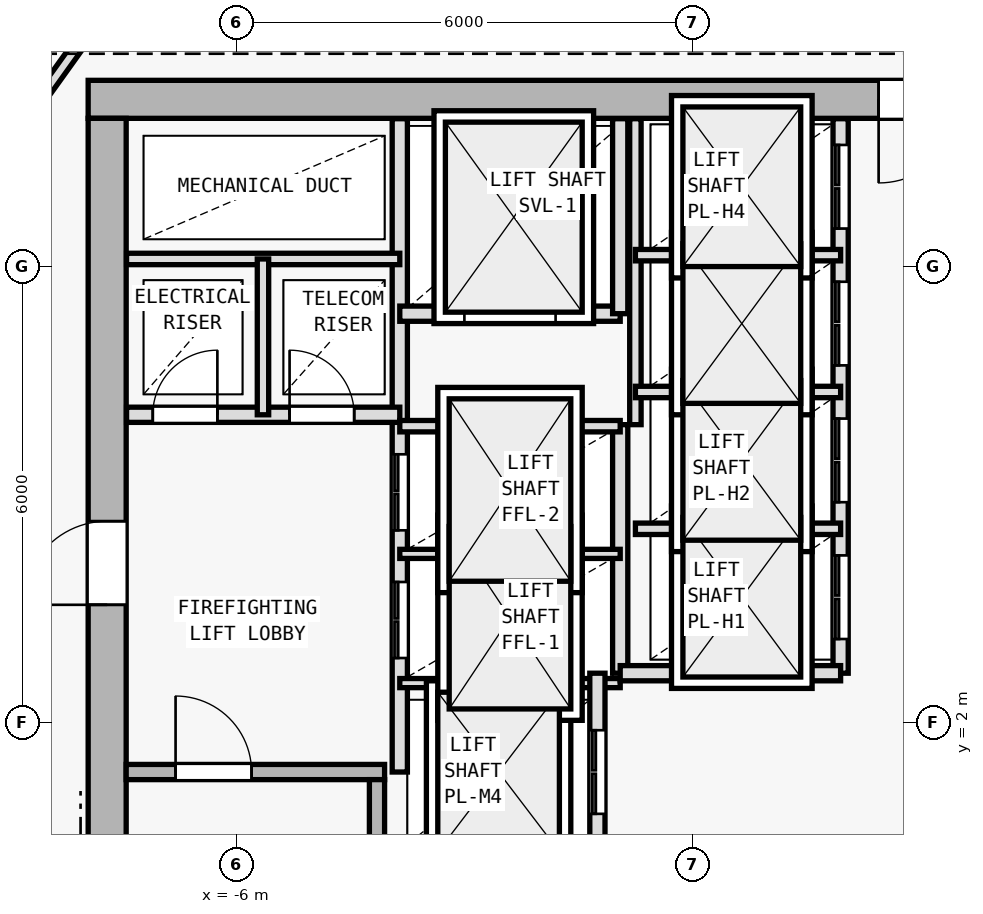
"""IFC4 building model, lengths in metres.
Left out: names, types, materials, properties, quantities, classifications, styles, units other than length and angle.
Written with IfcOpenShell. Run it as: python <this file> out.ifc"""

import sys

from ifc_helpers import new_model, si_unit, direction, frame, frame_2d, origin, origin_2d, place, context, subcontext, project, spatial, rectangle, i_section, extrude, element, fill, save


model = new_model("IFC4")
c1 = context("Model", 3, precision=1e-05, world=origin(), true_north=direction((0.0, 1.0)))
c2 = subcontext(c1, "Body", "Model", "MODEL_VIEW")
j1 = project(units=[si_unit("LENGTHUNIT", "METRE"), si_unit("PLANEANGLEUNIT", "RADIAN")], contexts=[c1])
p1 = place(None, origin())
s1 = spatial("IfcSite", under=j1, at=p1, CompositionType="ELEMENT")
p2 = place(p1, origin())
s2 = spatial("IfcBuilding", under=s1, at=p2, CompositionType="ELEMENT")
p3 = place(p2, frame((0.0, 0.0, 209.1)))
s3 = spatial("IfcBuildingStorey", under=s2, at=p3, CompositionType="ELEMENT", Elevation=209.1)
for number, where, z_axis, x_axis in (
    (1, (-7.7, 10.2, 0.0), (0.0, 0.0, 1.0), (1.0, 0.0, 0.0)),
    (2, (-7.7, 2.0, 0.0), (0.0, 0.0, 1.0), (1.0, 0.0, 0.0)),
):
    element("IfcColumn", number, at=place(p3, frame(where, z_axis=z_axis, x_axis=x_axis)), inside=s3, PredefinedType="COLUMN", context=c2, shape_type="SweptSolid", body=[
        extrude(i_section(OverallWidth=0.398, OverallDepth=0.387, WebThickness=0.013, FlangeThickness=0.022, FilletRadius=0.015, at=origin_2d()), origin(), (0.0, 0.0, 1.0), 3.6),
    ])
p4 = place(p3, frame((7.95, 10.2, 0.0), z_axis=(0.0, 0.0, 1.0), x_axis=(-1.0, 0.0, 0.0)))
e3 = element("IfcWall", 3, at=p4, inside=s3, PredefinedType="SHEAR", context=c2, shape_type="SweptSolid", body=[
    extrude(rectangle(XDim=15.9, YDim=0.5, at=frame_2d((7.95, 0.0))), origin(), (0.0, 0.0, 1.0), 3.35),
])
p5 = place(p4, frame((4.4, 0.0, 0.0)))
e4 = element("IfcOpeningElement", 4, at=p5, cuts=e3, PredefinedType="OPENING", context=c2, shape_type="SweptSolid", body=[
    extrude(rectangle(XDim=1.1, YDim=2.15, at=frame_2d((0.55, 1.075))), frame((0.0, 0.26, 0.0), z_axis=(0.0, -1.0, 0.0), x_axis=(1.0, 0.0, 0.0)), (0.0, 0.0, 1.0), 0.52),
])
p6 = place(p3, frame((-7.7, -9.15, 0.0), z_axis=(0.0, 0.0, 1.0), x_axis=(0.0, 1.0, 0.0)))
e5 = element("IfcWall", 5, at=p6, inside=s3, PredefinedType="SHEAR", context=c2, shape_type="SweptSolid", body=[
    extrude(rectangle(XDim=19.1, YDim=0.5, at=frame_2d((9.55, 0.0))), origin(), (0.0, 0.0, 1.0), 3.35),
])
p7 = place(p6, frame((12.7, 0.0, 0.0)))
e6 = element("IfcOpeningElement", 6, at=p7, cuts=e5, PredefinedType="OPENING", context=c2, shape_type="SweptSolid", body=[
    extrude(rectangle(XDim=1.1, YDim=2.15, at=frame_2d((0.55, 1.075))), frame((0.0, 0.26, 0.0), z_axis=(0.0, -1.0, 0.0), x_axis=(1.0, 0.0, 0.0)), (0.0, 0.0, 1.0), 0.52),
])
p8 = place(p3, frame((-7.45, 1.35, 0.0), z_axis=(0.0, 0.0, 1.0), x_axis=(1.0, 0.0, 0.0)))
e7 = element("IfcWall", 7, at=p8, inside=s3, PredefinedType="SOLIDWALL", context=c2, shape_type="SweptSolid", body=[
    extrude(rectangle(XDim=3.4, YDim=0.2, at=frame_2d((1.7, 0.0))), origin(), (0.0, 0.0, 1.0), 3.35),
])
p9 = place(p8, frame((0.65, 0.0, 0.0)))
e8 = element("IfcOpeningElement", 8, at=p9, cuts=e7, PredefinedType="OPENING", context=c2, shape_type="SweptSolid", body=[
    extrude(rectangle(XDim=1.0, YDim=2.15, at=frame_2d((0.5, 1.075))), frame((0.0, 0.11, 0.0), z_axis=(0.0, -1.0, 0.0), x_axis=(1.0, 0.0, 0.0)), (0.0, 0.0, 1.0), 0.22),
])
p10 = place(p3, frame((-4.15, -5.95, 0.0), z_axis=(0.0, 0.0, 1.0), x_axis=(0.0, 1.0, 0.0)))
e9 = element("IfcWall", 9, at=p10, inside=s3, PredefinedType="SOLIDWALL", context=c2, shape_type="SweptSolid", body=[
    extrude(rectangle(XDim=7.2, YDim=0.2, at=frame_2d((3.6, 0.0))), origin(), (0.0, 0.0, 1.0), 3.35),
])
p11 = place(p3, frame((-3.85, 1.35, 0.0), z_axis=(0.0, 0.0, 1.0), x_axis=(0.0, 1.0, 0.0)))
e10 = element("IfcWall", 10, at=p11, inside=s3, PredefinedType="SOLIDWALL", context=c2, shape_type="SweptSolid", body=[
    extrude(rectangle(XDim=8.595, YDim=0.2, at=frame_2d((4.297, 0.0))), origin(), (0.0, 0.0, 1.0), 3.35),
])
p12 = place(p11, frame((1.5, 0.0, 0.0)))
e11 = element("IfcOpeningElement", 11, at=p12, cuts=e10, PredefinedType="OPENING", context=c2, shape_type="SweptSolid", body=[
    extrude(rectangle(XDim=1.0, YDim=2.15, at=frame_2d((0.5, 1.075))), frame((0.0, 0.11, 0.0), z_axis=(0.0, -1.0, 0.0), x_axis=(1.0, 0.0, 0.0)), (0.0, 0.0, 1.0), 0.22),
])
p13 = place(p11, frame((3.18, 0.0, 0.0)))
e12 = element("IfcOpeningElement", 12, at=p13, cuts=e10, PredefinedType="OPENING", context=c2, shape_type="SweptSolid", body=[
    extrude(rectangle(XDim=1.0, YDim=2.15, at=frame_2d((0.5, 1.075))), frame((0.0, 0.11, 0.0), z_axis=(0.0, -1.0, 0.0), x_axis=(1.0, 0.0, 0.0)), (0.0, 0.0, 1.0), 0.22),
])
p14 = place(p3, frame((-7.445, 6.05, 0.0), z_axis=(0.0, 0.0, 1.0), x_axis=(1.0, 0.0, 0.0)))
e13 = element("IfcWall", 13, at=p14, inside=s3, PredefinedType="SOLIDWALL", context=c2, shape_type="SweptSolid", body=[
    extrude(rectangle(XDim=3.595, YDim=0.2, at=frame_2d((1.797, 0.0))), origin(), (0.0, 0.0, 1.0), 3.35),
])
p15 = place(p14, frame((0.345, 0.0, 0.0)))
e14 = element("IfcOpeningElement", 14, at=p15, cuts=e13, PredefinedType="OPENING", context=c2, shape_type="SweptSolid", body=[
    extrude(rectangle(XDim=0.85, YDim=2.1, at=frame_2d((0.425, 1.05))), frame((0.0, 0.11, 0.0), z_axis=(0.0, -1.0, 0.0), x_axis=(1.0, 0.0, 0.0)), (0.0, 0.0, 1.0), 0.22),
])
p16 = place(p14, frame((2.145, 0.0, 0.0)))
e15 = element("IfcOpeningElement", 15, at=p16, cuts=e13, PredefinedType="OPENING", context=c2, shape_type="SweptSolid", body=[
    extrude(rectangle(XDim=0.85, YDim=2.1, at=frame_2d((0.425, 1.05))), frame((0.0, 0.11, 0.0), z_axis=(0.0, -1.0, 0.0), x_axis=(1.0, 0.0, 0.0)), (0.0, 0.0, 1.0), 0.22),
])
p17 = place(p3, frame((-7.445, 8.1, 0.0), z_axis=(0.0, 0.0, 1.0), x_axis=(1.0, 0.0, 0.0)))
e16 = element("IfcWall", 16, at=p17, inside=s3, PredefinedType="PARTITIONING", context=c2, shape_type="SweptSolid", body=[
    extrude(rectangle(XDim=3.595, YDim=0.15, at=frame_2d((1.797, 0.0))), origin(), (0.0, 0.0, 1.0), 3.35),
])
p18 = place(p3, frame((-5.65, 6.05, 0.0), z_axis=(0.0, 0.0, 1.0), x_axis=(0.0, 1.0, 0.0)))
e17 = element("IfcWall", 17, at=p18, inside=s3, PredefinedType="PARTITIONING", context=c2, shape_type="SweptSolid", body=[
    extrude(rectangle(XDim=2.05, YDim=0.15, at=frame_2d((1.025, 0.0))), origin(), (0.0, 0.0, 1.0), 3.35),
])
p19 = place(p3, frame((-0.95, 2.65, 0.0), z_axis=(0.0, 0.0, 1.0), x_axis=(0.0, 1.0, 0.0)))
e18 = element("IfcWall", 18, at=p19, inside=s3, PredefinedType="SOLIDWALL", context=c2, shape_type="SweptSolid", body=[
    extrude(rectangle(XDim=3.27, YDim=0.2, at=frame_2d((1.635, 0.0))), origin(), (0.0, 0.0, 1.0), 3.35),
])
for number, where, z_axis, x_axis in (
    (19, (-3.85, 2.52, 0.0), (0.0, 0.0, 1.0), (1.0, 0.0, 0.0)),
    (20, (-3.85, 4.22, 0.0), (0.0, 0.0, 1.0), (1.0, 0.0, 0.0)),
):
    element("IfcWall", number, at=place(p3, frame(where, z_axis=z_axis, x_axis=x_axis)), inside=s3, PredefinedType="PARTITIONING", context=c2, shape_type="SweptSolid", body=[
        extrude(rectangle(XDim=2.9, YDim=0.12, at=frame_2d((1.45, 0.0))), origin(), (0.0, 0.0, 1.0), 3.35),
    ])
p20 = place(p3, frame((-3.85, 5.9, 0.0), z_axis=(0.0, 0.0, 1.0), x_axis=(1.0, 0.0, 0.0)))
e21 = element("IfcWall", 21, at=p20, inside=s3, PredefinedType="PARTITIONING", context=c2, shape_type="SweptSolid", body=[
    extrude(rectangle(XDim=2.9, YDim=0.15, at=frame_2d((1.45, 0.0))), origin(), (0.0, 0.0, 1.0), 3.35),
])
p21 = place(p3, frame((-3.85, 7.38, 0.0), z_axis=(0.0, 0.0, 1.0), x_axis=(1.0, 0.0, 0.0)))
e22 = element("IfcWall", 22, at=p21, inside=s3, PredefinedType="SOLIDWALL", context=c2, shape_type="SweptSolid", body=[
    extrude(rectangle(XDim=2.9, YDim=0.2, at=frame_2d((1.45, 0.0))), origin(), (0.0, 0.0, 1.0), 3.35),
])
p22 = place(p21, frame((0.85, 0.0, 0.0)))
e23 = element("IfcOpeningElement", 23, at=p22, cuts=e22, PredefinedType="OPENING", context=c2, shape_type="SweptSolid", body=[
    extrude(rectangle(XDim=1.2, YDim=2.2, at=frame_2d((0.6, 1.1))), frame((0.0, 0.11, 0.0), z_axis=(0.0, -1.0, 0.0), x_axis=(1.0, 0.0, 0.0)), (0.0, 0.0, 1.0), 0.22),
])
p23 = place(p3, frame((-0.95, 7.38, 0.0), z_axis=(0.0, 0.0, 1.0), x_axis=(0.0, 1.0, 0.0)))
e24 = element("IfcWall", 24, at=p23, inside=s3, PredefinedType="SOLIDWALL", context=c2, shape_type="SweptSolid", body=[
    extrude(rectangle(XDim=2.565, YDim=0.2, at=frame_2d((1.283, 0.0))), origin(), (0.0, 0.0, 1.0), 3.35),
])
p24 = place(p3, frame((-1.25, -6.05, 0.0), z_axis=(0.0, 0.0, 1.0), x_axis=(0.0, 1.0, 0.0)))
e25 = element("IfcWall", 25, at=p24, inside=s3, PredefinedType="SOLIDWALL", context=c2, shape_type="SweptSolid", body=[
    extrude(rectangle(XDim=8.7, YDim=0.2, at=frame_2d((4.35, 0.0))), origin(), (0.0, 0.0, 1.0), 3.35),
])
p25 = place(p24, frame((0.55, 0.0, 0.0)))
e26 = element("IfcOpeningElement", 26, at=p25, cuts=e25, PredefinedType="OPENING", context=c2, shape_type="SweptSolid", body=[
    extrude(rectangle(XDim=1.1, YDim=2.15, at=frame_2d((0.55, 1.075))), frame((0.0, 0.11, 0.0), z_axis=(0.0, -1.0, 0.0), x_axis=(1.0, 0.0, 0.0)), (0.0, 0.0, 1.0), 0.22),
])
p26 = place(p24, frame((2.65, 0.0, 0.0)))
e27 = element("IfcOpeningElement", 27, at=p26, cuts=e25, PredefinedType="OPENING", context=c2, shape_type="SweptSolid", body=[
    extrude(rectangle(XDim=1.1, YDim=2.15, at=frame_2d((0.55, 1.075))), frame((0.0, 0.11, 0.0), z_axis=(0.0, -1.0, 0.0), x_axis=(1.0, 0.0, 0.0)), (0.0, 0.0, 1.0), 0.22),
])
p27 = place(p24, frame((4.75, 0.0, 0.0)))
e28 = element("IfcOpeningElement", 28, at=p27, cuts=e25, PredefinedType="OPENING", context=c2, shape_type="SweptSolid", body=[
    extrude(rectangle(XDim=1.1, YDim=2.15, at=frame_2d((0.55, 1.075))), frame((0.0, 0.11, 0.0), z_axis=(0.0, -1.0, 0.0), x_axis=(1.0, 0.0, 0.0)), (0.0, 0.0, 1.0), 0.22),
])
p28 = place(p24, frame((6.85, 0.0, 0.0)))
e29 = element("IfcOpeningElement", 29, at=p28, cuts=e25, PredefinedType="OPENING", context=c2, shape_type="SweptSolid", body=[
    extrude(rectangle(XDim=1.1, YDim=2.15, at=frame_2d((0.55, 1.075))), frame((0.0, 0.11, 0.0), z_axis=(0.0, -1.0, 0.0), x_axis=(1.0, 0.0, 0.0)), (0.0, 0.0, 1.0), 0.22),
])
p29 = place(p3, frame((1.95, 2.65, 0.0), z_axis=(0.0, 0.0, 1.0), x_axis=(0.0, 1.0, 0.0)))
e30 = element("IfcWall", 30, at=p29, inside=s3, PredefinedType="SOLIDWALL", context=c2, shape_type="SweptSolid", body=[
    extrude(rectangle(XDim=7.295, YDim=0.2, at=frame_2d((3.647, 0.0))), origin(), (0.0, 0.0, 1.0), 3.35),
])
p30 = place(p29, frame((0.45, 0.0, 0.0)))
e31 = element("IfcOpeningElement", 31, at=p30, cuts=e30, PredefinedType="OPENING", context=c2, shape_type="SweptSolid", body=[
    extrude(rectangle(XDim=1.1, YDim=2.15, at=frame_2d((0.55, 1.075))), frame((0.0, 0.11, 0.0), z_axis=(0.0, -1.0, 0.0), x_axis=(1.0, 0.0, 0.0)), (0.0, 0.0, 1.0), 0.22),
])
p31 = place(p29, frame((2.25, 0.0, 0.0)))
e32 = element("IfcOpeningElement", 32, at=p31, cuts=e30, PredefinedType="OPENING", context=c2, shape_type="SweptSolid", body=[
    extrude(rectangle(XDim=1.1, YDim=2.15, at=frame_2d((0.55, 1.075))), frame((0.0, 0.11, 0.0), z_axis=(0.0, -1.0, 0.0), x_axis=(1.0, 0.0, 0.0)), (0.0, 0.0, 1.0), 0.22),
])
p32 = place(p29, frame((4.05, 0.0, 0.0)))
e33 = element("IfcOpeningElement", 33, at=p32, cuts=e30, PredefinedType="OPENING", context=c2, shape_type="SweptSolid", body=[
    extrude(rectangle(XDim=1.1, YDim=2.15, at=frame_2d((0.55, 1.075))), frame((0.0, 0.11, 0.0), z_axis=(0.0, -1.0, 0.0), x_axis=(1.0, 0.0, 0.0)), (0.0, 0.0, 1.0), 0.22),
])
p33 = place(p29, frame((5.85, 0.0, 0.0)))
e34 = element("IfcOpeningElement", 34, at=p33, cuts=e30, PredefinedType="OPENING", context=c2, shape_type="SweptSolid", body=[
    extrude(rectangle(XDim=1.1, YDim=2.15, at=frame_2d((0.55, 1.075))), frame((0.0, 0.11, 0.0), z_axis=(0.0, -1.0, 0.0), x_axis=(1.0, 0.0, 0.0)), (0.0, 0.0, 1.0), 0.22),
])
p34 = place(p3, frame((-0.95, 2.65, 0.0), z_axis=(0.0, 0.0, 1.0), x_axis=(1.0, 0.0, 0.0)))
e35 = element("IfcWall", 35, at=p34, inside=s3, PredefinedType="SOLIDWALL", context=c2, shape_type="SweptSolid", body=[
    extrude(rectangle(XDim=2.9, YDim=0.2, at=frame_2d((1.45, 0.0))), origin(), (0.0, 0.0, 1.0), 3.35),
])
p35 = place(p3, frame((-0.75, 5.92, 0.0), z_axis=(0.0, 0.0, 1.0), x_axis=(0.0, 1.0, 0.0)))
e36 = element("IfcWall", 36, at=p35, inside=s3, PredefinedType="PARTITIONING", context=c2, shape_type="SweptSolid", body=[
    extrude(rectangle(XDim=4.025, YDim=0.15, at=frame_2d((2.013, 0.0))), origin(), (0.0, 0.0, 1.0), 3.35),
])
for number, where, z_axis, x_axis in (
    (37, (-0.75, 4.55, 0.0), (0.0, 0.0, 1.0), (1.0, 0.0, 0.0)),
    (38, (-0.75, 6.35, 0.0), (0.0, 0.0, 1.0), (1.0, 0.0, 0.0)),
    (39, (-0.75, 8.15, 0.0), (0.0, 0.0, 1.0), (1.0, 0.0, 0.0)),
):
    element("IfcWall", number, at=place(p3, frame(where, z_axis=z_axis, x_axis=x_axis)), inside=s3, PredefinedType="PARTITIONING", context=c2, shape_type="SweptSolid", body=[
        extrude(rectangle(XDim=2.7, YDim=0.15, at=frame_2d((1.35, 0.0))), origin(), (0.0, 0.0, 1.0), 3.35),
    ])
p36 = place(p3, frame((-9.86, 8.426, 0.0), z_axis=(0.0, 0.0, 1.0), x_axis=(0.582449511476, 0.812866881218, 0.0)))
e40 = element("IfcWall", 40, at=p36, inside=s3, PredefinedType="PARTITIONING", context=c2, shape_type="SweptSolid", body=[
    extrude(rectangle(XDim=4.84, YDim=0.15, at=frame_2d((2.42, 0.0))), origin(), (0.0, 0.0, 1.0), 2.975),
])
p37 = place(p7, origin())
e41 = element("IfcDoor", 41, at=p37, inside=s3, OperationType="SINGLE_SWING_LEFT", PredefinedType="DOOR", context=c2, shape_type="SweptSolid", body=[
    extrude(rectangle(XDim=1.1, YDim=2.15, at=frame_2d((0.55, 1.075))), frame((0.0, 0.025, 0.0), z_axis=(0.0, -1.0, 0.0), x_axis=(1.0, 0.0, 0.0)), (0.0, 0.0, 1.0), 0.05),
])
fill(e6, e41)
p38 = place(p5, origin())
e42 = element("IfcDoor", 42, at=p38, inside=s3, OperationType="SINGLE_SWING_RIGHT", PredefinedType="DOOR", context=c2, shape_type="SweptSolid", body=[
    extrude(rectangle(XDim=1.1, YDim=2.15, at=frame_2d((0.55, 1.075))), frame((0.0, 0.025, 0.0), z_axis=(0.0, -1.0, 0.0), x_axis=(1.0, 0.0, 0.0)), (0.0, 0.0, 1.0), 0.05),
])
fill(e4, e42)
p39 = place(p9, origin())
e43 = element("IfcDoor", 43, at=p39, inside=s3, OperationType="SINGLE_SWING_LEFT", PredefinedType="DOOR", context=c2, shape_type="SweptSolid", body=[
    extrude(rectangle(XDim=1.0, YDim=2.15, at=frame_2d((0.5, 1.075))), frame((0.0, 0.025, 0.0), z_axis=(0.0, -1.0, 0.0), x_axis=(1.0, 0.0, 0.0)), (0.0, 0.0, 1.0), 0.05),
])
fill(e8, e43)
p40 = place(p15, origin())
e44 = element("IfcDoor", 44, at=p40, inside=s3, OperationType="SINGLE_SWING_RIGHT", PredefinedType="DOOR", context=c2, shape_type="SweptSolid", body=[
    extrude(rectangle(XDim=0.85, YDim=2.1, at=frame_2d((0.425, 1.05))), frame((0.0, 0.025, 0.0), z_axis=(0.0, -1.0, 0.0), x_axis=(1.0, 0.0, 0.0)), (0.0, 0.0, 1.0), 0.05),
])
fill(e14, e44)
p41 = place(p16, origin())
e45 = element("IfcDoor", 45, at=p41, inside=s3, OperationType="SINGLE_SWING_LEFT", PredefinedType="DOOR", context=c2, shape_type="SweptSolid", body=[
    extrude(rectangle(XDim=0.85, YDim=2.1, at=frame_2d((0.425, 1.05))), frame((0.0, 0.025, 0.0), z_axis=(0.0, -1.0, 0.0), x_axis=(1.0, 0.0, 0.0)), (0.0, 0.0, 1.0), 0.05),
])
fill(e15, e45)
p42 = place(p22, origin())
e46 = element("IfcDoor", 46, at=p42, inside=s3, OperationType="DOUBLE_DOOR_SLIDING", PredefinedType="DOOR", context=c2, shape_type="SweptSolid", body=[
    extrude(rectangle(XDim=1.2, YDim=2.2, at=frame_2d((0.6, 1.1))), frame((0.0, 0.025, 0.0), z_axis=(0.0, -1.0, 0.0), x_axis=(1.0, 0.0, 0.0)), (0.0, 0.0, 1.0), 0.05),
])
fill(e23, e46)
p43 = place(p28, origin())
e47 = element("IfcDoor", 47, at=p43, inside=s3, OperationType="DOUBLE_DOOR_SLIDING", PredefinedType="DOOR", context=c2, shape_type="SweptSolid", body=[
    extrude(rectangle(XDim=1.1, YDim=2.15, at=frame_2d((0.55, 1.075))), frame((0.0, 0.025, 0.0), z_axis=(0.0, -1.0, 0.0), x_axis=(1.0, 0.0, 0.0)), (0.0, 0.0, 1.0), 0.05),
])
fill(e29, e47)
p44 = place(p30, origin())
e48 = element("IfcDoor", 48, at=p44, inside=s3, OperationType="DOUBLE_DOOR_SLIDING", PredefinedType="DOOR", context=c2, shape_type="SweptSolid", body=[
    extrude(rectangle(XDim=1.1, YDim=2.15, at=frame_2d((0.55, 1.075))), frame((0.0, 0.025, 0.0), z_axis=(0.0, -1.0, 0.0), x_axis=(1.0, 0.0, 0.0)), (0.0, 0.0, 1.0), 0.05),
])
fill(e31, e48)
p45 = place(p31, origin())
e49 = element("IfcDoor", 49, at=p45, inside=s3, OperationType="DOUBLE_DOOR_SLIDING", PredefinedType="DOOR", context=c2, shape_type="SweptSolid", body=[
    extrude(rectangle(XDim=1.1, YDim=2.15, at=frame_2d((0.55, 1.075))), frame((0.0, 0.025, 0.0), z_axis=(0.0, -1.0, 0.0), x_axis=(1.0, 0.0, 0.0)), (0.0, 0.0, 1.0), 0.05),
])
fill(e32, e49)
p46 = place(p32, origin())
e50 = element("IfcDoor", 50, at=p46, inside=s3, OperationType="DOUBLE_DOOR_SLIDING", PredefinedType="DOOR", context=c2, shape_type="SweptSolid", body=[
    extrude(rectangle(XDim=1.1, YDim=2.15, at=frame_2d((0.55, 1.075))), frame((0.0, 0.025, 0.0), z_axis=(0.0, -1.0, 0.0), x_axis=(1.0, 0.0, 0.0)), (0.0, 0.0, 1.0), 0.05),
])
fill(e33, e50)
p47 = place(p33, origin())
e51 = element("IfcDoor", 51, at=p47, inside=s3, OperationType="DOUBLE_DOOR_SLIDING", PredefinedType="DOOR", context=c2, shape_type="SweptSolid", body=[
    extrude(rectangle(XDim=1.1, YDim=2.15, at=frame_2d((0.55, 1.075))), frame((0.0, 0.025, 0.0), z_axis=(0.0, -1.0, 0.0), x_axis=(1.0, 0.0, 0.0)), (0.0, 0.0, 1.0), 0.05),
])
fill(e34, e51)
p48 = place(p12, origin())
e52 = element("IfcDoor", 52, at=p48, inside=s3, OperationType="DOUBLE_DOOR_SLIDING", PredefinedType="DOOR", context=c2, shape_type="SweptSolid", body=[
    extrude(rectangle(XDim=1.0, YDim=2.15, at=frame_2d((0.5, 1.075))), frame((0.0, 0.025, 0.0), z_axis=(0.0, -1.0, 0.0), x_axis=(1.0, 0.0, 0.0)), (0.0, 0.0, 1.0), 0.05),
])
fill(e11, e52)
p49 = place(p13, origin())
e53 = element("IfcDoor", 53, at=p49, inside=s3, OperationType="DOUBLE_DOOR_SLIDING", PredefinedType="DOOR", context=c2, shape_type="SweptSolid", body=[
    extrude(rectangle(XDim=1.0, YDim=2.15, at=frame_2d((0.5, 1.075))), frame((0.0, 0.025, 0.0), z_axis=(0.0, -1.0, 0.0), x_axis=(1.0, 0.0, 0.0)), (0.0, 0.0, 1.0), 0.05),
])
fill(e12, e53)
save(model, sys.argv[1])
